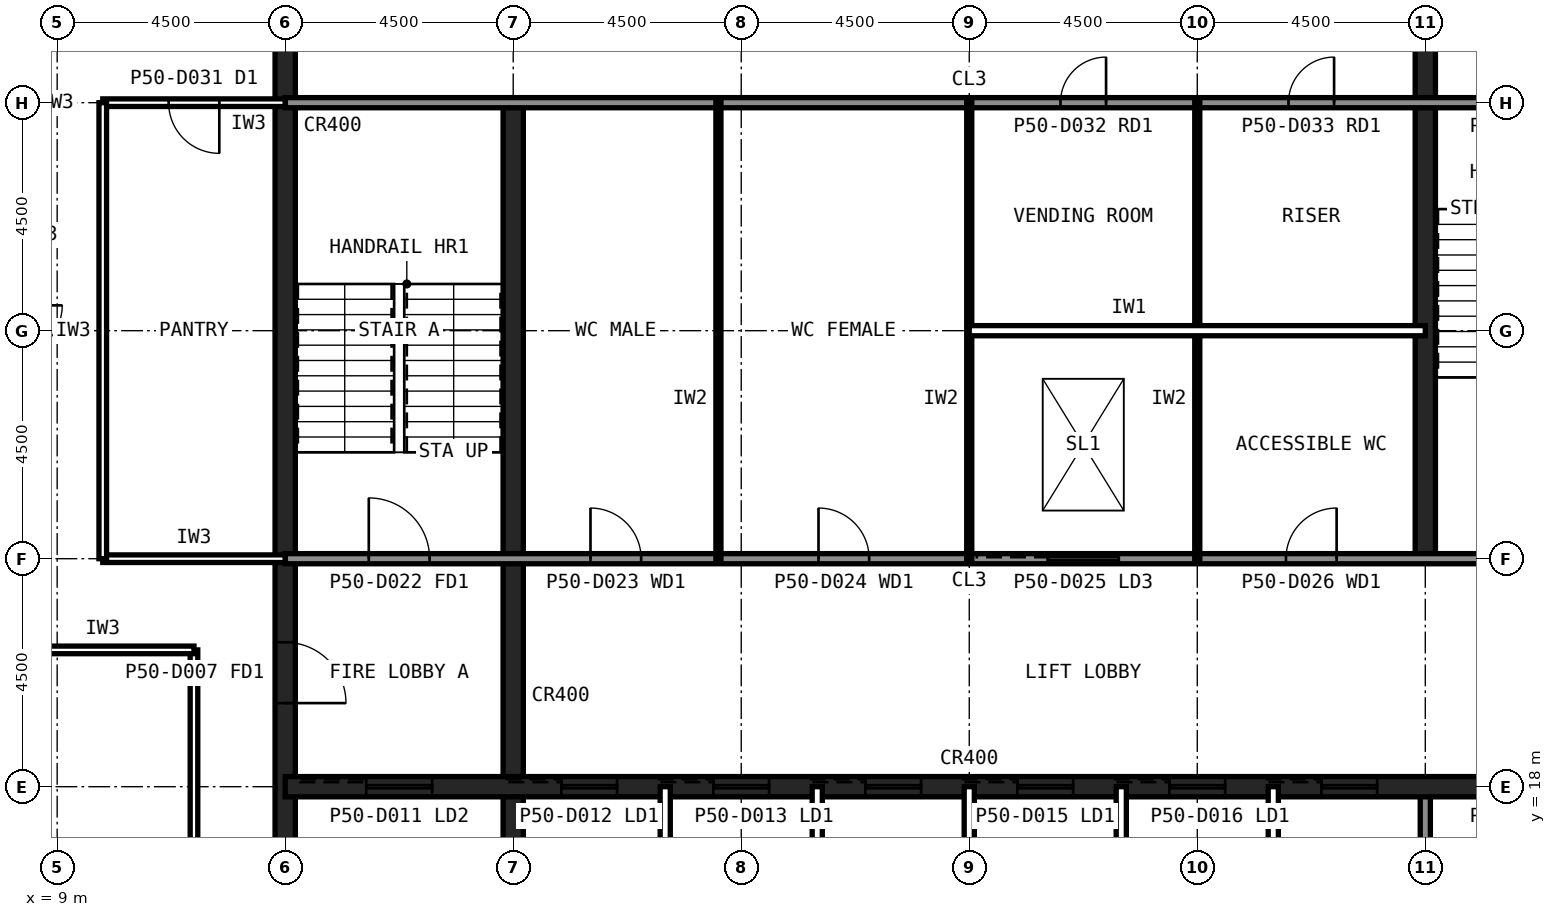
"""IFC4 building model, lengths in metres.
Left out: names, types, materials, properties, quantities, classifications, styles, units other than length and angle.
Written with IfcOpenShell. Run it as: python <this file> out.ifc"""

import sys

from ifc_helpers import new_model, si_unit, direction, frame, frame_2d, origin, place, context, subcontext, project, spatial, rectangle, extrude, element, fill, save


model = new_model("IFC4")
c1 = context("Model", 3, precision=1e-05, world=origin(), true_north=direction((0.0, 1.0)))
c2 = subcontext(c1, "Body", "Model", "MODEL_VIEW")
j1 = project(units=[si_unit("LENGTHUNIT", "METRE"), si_unit("PLANEANGLEUNIT", "RADIAN")], contexts=[c1])
p1 = place(None, origin())
s1 = spatial("IfcSite", under=j1, at=p1, CompositionType="ELEMENT")
p2 = place(p1, origin())
s2 = spatial("IfcBuilding", under=s1, at=p2, CompositionType="ELEMENT")
p3 = place(p2, frame((0.0, 0.0, 214.6)))
s3 = spatial("IfcBuildingStorey", under=s2, at=p3, CompositionType="ELEMENT", Elevation=214.6)
p4 = place(p3, frame((13.5, 40.5, 0.0), z_axis=(0.0, 0.0, 1.0), x_axis=(0.0, -1.0, 0.0)))
e1 = element("IfcWall", 1, at=p4, inside=s3, PredefinedType="SHEAR", context=c2, shape_type="SweptSolid", body=[
    extrude(rectangle(XDim=27.0, YDim=0.4, at=frame_2d((13.5, 0.0))), origin(), (0.0, 0.0, 1.0), 4.0),
])
p5 = place(p4, frame((19.65, 0.0, 0.0)))
e2 = element("IfcOpeningElement", 2, at=p5, cuts=e1, PredefinedType="OPENING", context=c2, shape_type="SweptSolid", body=[
    extrude(rectangle(XDim=1.2, YDim=2.1, at=frame_2d((0.6, 1.05))), frame((0.0, 0.21, 0.0), z_axis=(0.0, -1.0, 0.0), x_axis=(1.0, 0.0, 0.0)), (0.0, 0.0, 1.0), 0.42),
])
p6 = place(p4, frame((5.85, 0.0, 0.0)))
e3 = element("IfcOpeningElement", 3, at=p6, cuts=e1, PredefinedType="OPENING", context=c2, shape_type="SweptSolid", body=[
    extrude(rectangle(XDim=1.8, YDim=2.1, at=frame_2d((0.9, 1.05))), frame((0.0, 0.21, 0.0), z_axis=(0.0, -1.0, 0.0), x_axis=(1.0, 0.0, 0.0)), (0.0, 0.0, 1.0), 0.42),
])
p7 = place(p3, frame((18.0, 13.5, 0.0), z_axis=(0.0, 0.0, 1.0), x_axis=(0.0, 1.0, 0.0)))
e4 = element("IfcWall", 4, at=p7, inside=s3, PredefinedType="SHEAR", context=c2, shape_type="SweptSolid", body=[
    extrude(rectangle(XDim=18.0, YDim=0.4, at=frame_2d((9.0, 0.0))), origin(), (0.0, 0.0, 1.0), 4.0),
])
p8 = place(p3, frame((36.0, 13.5, 0.0), z_axis=(0.0, 0.0, 1.0), x_axis=(0.0, 1.0, 0.0)))
e5 = element("IfcWall", 5, at=p8, inside=s3, PredefinedType="SOLIDWALL", context=c2, shape_type="SweptSolid", body=[
    extrude(rectangle(XDim=4.5, YDim=0.2, at=frame_2d((2.25, 0.0))), origin(), (0.0, 0.0, 1.0), 3.84),
])
p9 = place(p3, frame((36.0, 22.5, 0.0), z_axis=(0.0, 0.0, 1.0), x_axis=(0.0, 1.0, 0.0)))
e6 = element("IfcWall", 6, at=p9, inside=s3, PredefinedType="SHEAR", context=c2, shape_type="SweptSolid", body=[
    extrude(rectangle(XDim=18.0, YDim=0.4, at=frame_2d((9.0, 0.0))), origin(), (0.0, 0.0, 1.0), 4.0),
])
p10 = place(p3, frame((13.5, 18.0, 0.0), z_axis=(0.0, 0.0, 1.0), x_axis=(1.0, 0.0, 0.0)))
e7 = element("IfcWall", 7, at=p10, inside=s3, PredefinedType="SHEAR", context=c2, shape_type="SweptSolid", body=[
    extrude(rectangle(XDim=27.0, YDim=0.4, at=frame_2d((13.5, 0.0))), origin(), (0.0, 0.0, 1.0), 4.0),
])
p11 = place(p10, frame((24.3, 0.0, 0.0)))
e8 = element("IfcOpeningElement", 8, at=p11, cuts=e7, PredefinedType="OPENING", context=c2, shape_type="SweptSolid", body=[
    extrude(rectangle(XDim=0.9, YDim=2.1, at=frame_2d((0.45, 1.05))), frame((0.0, 0.21, 0.0), z_axis=(0.0, -1.0, 0.0), x_axis=(1.0, 0.0, 0.0)), (0.0, 0.0, 1.0), 0.42),
])
p12 = place(p10, frame((5.45, 0.0, 0.0)))
e9 = element("IfcOpeningElement", 9, at=p12, cuts=e7, PredefinedType="OPENING", context=c2, shape_type="SweptSolid", body=[
    extrude(rectangle(XDim=1.1, YDim=2.1, at=frame_2d((0.55, 1.05))), frame((0.0, 0.21, 0.0), z_axis=(0.0, -1.0, 0.0), x_axis=(1.0, 0.0, 0.0)), (0.0, 0.0, 1.0), 0.42),
])
p13 = place(p10, frame((8.45, 0.0, 0.0)))
e10 = element("IfcOpeningElement", 10, at=p13, cuts=e7, PredefinedType="OPENING", context=c2, shape_type="SweptSolid", body=[
    extrude(rectangle(XDim=1.1, YDim=2.1, at=frame_2d((0.55, 1.05))), frame((0.0, 0.21, 0.0), z_axis=(0.0, -1.0, 0.0), x_axis=(1.0, 0.0, 0.0)), (0.0, 0.0, 1.0), 0.42),
])
p14 = place(p10, frame((11.45, 0.0, 0.0)))
e11 = element("IfcOpeningElement", 11, at=p14, cuts=e7, PredefinedType="OPENING", context=c2, shape_type="SweptSolid", body=[
    extrude(rectangle(XDim=1.1, YDim=2.1, at=frame_2d((0.55, 1.05))), frame((0.0, 0.21, 0.0), z_axis=(0.0, -1.0, 0.0), x_axis=(1.0, 0.0, 0.0)), (0.0, 0.0, 1.0), 0.42),
])
p15 = place(p10, frame((14.45, 0.0, 0.0)))
e12 = element("IfcOpeningElement", 12, at=p15, cuts=e7, PredefinedType="OPENING", context=c2, shape_type="SweptSolid", body=[
    extrude(rectangle(XDim=1.1, YDim=2.1, at=frame_2d((0.55, 1.05))), frame((0.0, 0.21, 0.0), z_axis=(0.0, -1.0, 0.0), x_axis=(1.0, 0.0, 0.0)), (0.0, 0.0, 1.0), 0.42),
])
p16 = place(p10, frame((17.45, 0.0, 0.0)))
e13 = element("IfcOpeningElement", 13, at=p16, cuts=e7, PredefinedType="OPENING", context=c2, shape_type="SweptSolid", body=[
    extrude(rectangle(XDim=1.1, YDim=2.1, at=frame_2d((0.55, 1.05))), frame((0.0, 0.21, 0.0), z_axis=(0.0, -1.0, 0.0), x_axis=(1.0, 0.0, 0.0)), (0.0, 0.0, 1.0), 0.42),
])
p17 = place(p10, frame((20.45, 0.0, 0.0)))
e14 = element("IfcOpeningElement", 14, at=p17, cuts=e7, PredefinedType="OPENING", context=c2, shape_type="SweptSolid", body=[
    extrude(rectangle(XDim=1.1, YDim=2.1, at=frame_2d((0.55, 1.05))), frame((0.0, 0.21, 0.0), z_axis=(0.0, -1.0, 0.0), x_axis=(1.0, 0.0, 0.0)), (0.0, 0.0, 1.0), 0.42),
])
p18 = place(p10, frame((1.6, 0.0, 0.0)))
e15 = element("IfcOpeningElement", 15, at=p18, cuts=e7, PredefinedType="OPENING", context=c2, shape_type="SweptSolid", body=[
    extrude(rectangle(XDim=1.3, YDim=2.2, at=frame_2d((0.65, 1.1))), frame((0.0, 0.21, 0.0), z_axis=(0.0, -1.0, 0.0), x_axis=(1.0, 0.0, 0.0)), (0.0, 0.0, 1.0), 0.42),
])
p19 = place(p3, frame((13.5, 22.5, 0.0), z_axis=(0.0, 0.0, 1.0), x_axis=(1.0, 0.0, 0.0)))
e16 = element("IfcWall", 16, at=p19, inside=s3, PredefinedType="SOLIDWALL", context=c2, shape_type="SweptSolid", body=[
    extrude(rectangle(XDim=27.0, YDim=0.2, at=frame_2d((13.5, 0.0))), origin(), (0.0, 0.0, 1.0), 3.84),
])
p20 = place(p19, frame((1.65, 0.0, 0.0)))
e17 = element("IfcOpeningElement", 17, at=p20, cuts=e16, PredefinedType="OPENING", context=c2, shape_type="SweptSolid", body=[
    extrude(rectangle(XDim=1.2, YDim=2.1, at=frame_2d((0.6, 1.05))), frame((0.0, 0.11, 0.0), z_axis=(0.0, -1.0, 0.0), x_axis=(1.0, 0.0, 0.0)), (0.0, 0.0, 1.0), 0.22),
])
p21 = place(p19, frame((6.025, 0.0, 0.0)))
e18 = element("IfcOpeningElement", 18, at=p21, cuts=e16, PredefinedType="OPENING", context=c2, shape_type="SweptSolid", body=[
    extrude(rectangle(XDim=1.0, YDim=2.1, at=frame_2d((0.5, 1.05))), frame((0.0, 0.11, 0.0), z_axis=(0.0, -1.0, 0.0), x_axis=(1.0, 0.0, 0.0)), (0.0, 0.0, 1.0), 0.22),
])
p22 = place(p19, frame((10.525, 0.0, 0.0)))
e19 = element("IfcOpeningElement", 19, at=p22, cuts=e16, PredefinedType="OPENING", context=c2, shape_type="SweptSolid", body=[
    extrude(rectangle(XDim=1.0, YDim=2.1, at=frame_2d((0.5, 1.05))), frame((0.0, 0.11, 0.0), z_axis=(0.0, -1.0, 0.0), x_axis=(1.0, 0.0, 0.0)), (0.0, 0.0, 1.0), 0.22),
])
p23 = place(p19, frame((19.75, 0.0, 0.0)))
e20 = element("IfcOpeningElement", 20, at=p23, cuts=e16, PredefinedType="OPENING", context=c2, shape_type="SweptSolid", body=[
    extrude(rectangle(XDim=1.0, YDim=2.1, at=frame_2d((0.5, 1.05))), frame((0.0, 0.11, 0.0), z_axis=(0.0, -1.0, 0.0), x_axis=(1.0, 0.0, 0.0)), (0.0, 0.0, 1.0), 0.22),
])
p24 = place(p19, frame((15.05, 0.0, 0.0)))
e21 = element("IfcOpeningElement", 21, at=p24, cuts=e16, PredefinedType="OPENING", context=c2, shape_type="SweptSolid", body=[
    extrude(rectangle(XDim=1.4, YDim=2.4, at=frame_2d((0.7, 1.2))), frame((0.0, 0.11, 0.0), z_axis=(0.0, -1.0, 0.0), x_axis=(1.0, 0.0, 0.0)), (0.0, 0.0, 1.0), 0.22),
])
p25 = place(p3, frame((13.5, 31.5, 0.0), z_axis=(0.0, 0.0, 1.0), x_axis=(1.0, 0.0, 0.0)))
e22 = element("IfcWall", 22, at=p25, inside=s3, PredefinedType="SOLIDWALL", context=c2, shape_type="SweptSolid", body=[
    extrude(rectangle(XDim=27.0, YDim=0.2, at=frame_2d((13.5, 0.0))), origin(), (0.0, 0.0, 1.0), 3.84),
])
p26 = place(p25, frame((24.15, 0.0, 0.0)))
e23 = element("IfcOpeningElement", 23, at=p26, cuts=e22, PredefinedType="OPENING", context=c2, shape_type="SweptSolid", body=[
    extrude(rectangle(XDim=1.2, YDim=2.1, at=frame_2d((0.6, 1.05))), frame((0.0, 0.11, 0.0), z_axis=(0.0, -1.0, 0.0), x_axis=(1.0, 0.0, 0.0)), (0.0, 0.0, 1.0), 0.22),
])
p27 = place(p25, frame((15.3, 0.0, 0.0)))
e24 = element("IfcOpeningElement", 24, at=p27, cuts=e22, PredefinedType="OPENING", context=c2, shape_type="SweptSolid", body=[
    extrude(rectangle(XDim=0.9, YDim=2.1, at=frame_2d((0.45, 1.05))), frame((0.0, 0.11, 0.0), z_axis=(0.0, -1.0, 0.0), x_axis=(1.0, 0.0, 0.0)), (0.0, 0.0, 1.0), 0.22),
])
p28 = place(p25, frame((19.8, 0.0, 0.0)))
e25 = element("IfcOpeningElement", 25, at=p28, cuts=e22, PredefinedType="OPENING", context=c2, shape_type="SweptSolid", body=[
    extrude(rectangle(XDim=0.9, YDim=2.1, at=frame_2d((0.45, 1.05))), frame((0.0, 0.11, 0.0), z_axis=(0.0, -1.0, 0.0), x_axis=(1.0, 0.0, 0.0)), (0.0, 0.0, 1.0), 0.22),
])
for number, where, z_axis, x_axis in (
    (26, (21.0, 13.5, 0.0), (0.0, 0.0, 1.0), (0.0, 1.0, 0.0)),
    (27, (24.0, 13.5, 0.0), (0.0, 0.0, 1.0), (0.0, 1.0, 0.0)),
    (28, (27.0, 13.5, 0.0), (0.0, 0.0, 1.0), (0.0, 1.0, 0.0)),
    (29, (30.0, 13.5, 0.0), (0.0, 0.0, 1.0), (0.0, 1.0, 0.0)),
    (30, (33.0, 13.5, 0.0), (0.0, 0.0, 1.0), (0.0, 1.0, 0.0)),
):
    element("IfcWall", number, at=place(p3, frame(where, z_axis=z_axis, x_axis=x_axis)), inside=s3, PredefinedType="PARTITIONING", context=c2, shape_type="SweptSolid", body=[
        extrude(rectangle(XDim=4.5, YDim=0.2, at=frame_2d((2.25, 0.0))), origin(), (0.0, 0.0, 1.0), 3.84),
    ])
for number, where, z_axis, x_axis in (
    (31, (22.05, 22.5, 0.0), (0.0, 0.0, 1.0), (0.0, 1.0, 0.0)),
    (32, (27.0, 22.5, 0.0), (0.0, 0.0, 1.0), (0.0, 1.0, 0.0)),
    (33, (31.5, 22.5, 0.0), (0.0, 0.0, 1.0), (0.0, 1.0, 0.0)),
):
    element("IfcWall", number, at=place(p3, frame(where, z_axis=z_axis, x_axis=x_axis)), inside=s3, PredefinedType="PLUMBINGWALL", context=c2, shape_type="SweptSolid", body=[
        extrude(rectangle(XDim=9.0, YDim=0.1, at=frame_2d((4.5, 0.0))), origin(), (0.0, 0.0, 1.0), 3.84),
    ])
p29 = place(p3, frame((27.0, 27.0, 0.0), z_axis=(0.0, 0.0, 1.0), x_axis=(1.0, 0.0, 0.0)))
e34 = element("IfcWall", 34, at=p29, inside=s3, PredefinedType="PARTITIONING", context=c2, shape_type="SweptSolid", body=[
    extrude(rectangle(XDim=9.0, YDim=0.2, at=frame_2d((4.5, 0.0))), origin(), (0.0, 0.0, 1.0), 3.84),
])
p30 = place(p3, frame((11.7, 20.7, 0.0), z_axis=(0.0, 0.0, 1.0), x_axis=(0.0, -1.0, 0.0)))
e35 = element("IfcWall", 35, at=p30, inside=s3, PredefinedType="PARTITIONING", context=c2, shape_type="SweptSolid", body=[
    extrude(rectangle(XDim=9.0, YDim=0.15, at=frame_2d((4.5, 0.0))), origin(), (0.0, 0.0, 1.0), 3.84),
])
p31 = place(p3, frame((8.1, 20.7, 0.0), z_axis=(0.0, 0.0, 1.0), x_axis=(1.0, 0.0, 0.0)))
e36 = element("IfcWall", 36, at=p31, inside=s3, PredefinedType="PARTITIONING", context=c2, shape_type="SweptSolid", body=[
    extrude(rectangle(XDim=3.6, YDim=0.15, at=frame_2d((1.8, 0.0))), origin(), (0.0, 0.0, 1.0), 3.84),
])
p32 = place(p3, frame((9.9, 22.5, 0.0), z_axis=(0.0, 0.0, 1.0), x_axis=(1.0, 0.0, 0.0)))
e37 = element("IfcWall", 37, at=p32, inside=s3, PredefinedType="PARTITIONING", context=c2, shape_type="SweptSolid", body=[
    extrude(rectangle(XDim=3.6, YDim=0.15, at=frame_2d((1.8, 0.0))), origin(), (0.0, 0.0, 1.0), 2.989),
])
p33 = place(p3, frame((13.5, 31.5, 0.0), z_axis=(0.0, 0.0, 1.0), x_axis=(-1.0, 0.0, 0.0)))
e38 = element("IfcWall", 38, at=p33, inside=s3, PredefinedType="PARTITIONING", context=c2, shape_type="SweptSolid", body=[
    extrude(rectangle(XDim=3.6, YDim=0.15, at=frame_2d((1.8, 0.0))), origin(), (0.0, 0.0, 1.0), 2.989),
])
p34 = place(p33, frame((1.3, 0.0, 0.0)))
e39 = element("IfcOpeningElement", 39, at=p34, cuts=e38, PredefinedType="OPENING", context=c2, shape_type="SweptSolid", body=[
    extrude(rectangle(XDim=1.0, YDim=2.1, at=frame_2d((0.5, 1.05))), frame((0.0, 0.085, 0.0), z_axis=(0.0, -1.0, 0.0), x_axis=(1.0, 0.0, 0.0)), (0.0, 0.0, 1.0), 0.17),
])
p35 = place(p3, frame((9.9, 31.5, 0.0), z_axis=(0.0, 0.0, 1.0), x_axis=(0.0, -1.0, 0.0)))
e40 = element("IfcWall", 40, at=p35, inside=s3, PredefinedType="PARTITIONING", context=c2, shape_type="SweptSolid", body=[
    extrude(rectangle(XDim=9.0, YDim=0.15, at=frame_2d((4.5, 0.0))), origin(), (0.0, 0.0, 1.0), 3.84),
])
p36 = place(p5, origin())
e41 = element("IfcDoor", 41, at=p36, inside=s3, OperationType="SINGLE_SWING_RIGHT", PredefinedType="DOOR", context=c2, shape_type="SweptSolid", body=[
    extrude(rectangle(XDim=1.2, YDim=2.1, at=frame_2d((0.6, 1.05))), frame((0.0, 0.025, 0.0), z_axis=(0.0, -1.0, 0.0), x_axis=(1.0, 0.0, 0.0)), (0.0, 0.0, 1.0), 0.05),
])
fill(e2, e41)
p37 = place(p20, origin())
e42 = element("IfcDoor", 42, at=p37, inside=s3, OperationType="SINGLE_SWING_LEFT", PredefinedType="DOOR", context=c2, shape_type="SweptSolid", body=[
    extrude(rectangle(XDim=1.2, YDim=2.1, at=frame_2d((0.6, 1.05))), frame((0.0, 0.025, 0.0), z_axis=(0.0, -1.0, 0.0), x_axis=(1.0, 0.0, 0.0)), (0.0, 0.0, 1.0), 0.05),
])
fill(e17, e42)
p38 = place(p21, origin())
e43 = element("IfcDoor", 43, at=p38, inside=s3, OperationType="SINGLE_SWING_LEFT", PredefinedType="DOOR", context=c2, shape_type="SweptSolid", body=[
    extrude(rectangle(XDim=1.0, YDim=2.1, at=frame_2d((0.5, 1.05))), frame((0.0, 0.025, 0.0), z_axis=(0.0, -1.0, 0.0), x_axis=(1.0, 0.0, 0.0)), (0.0, 0.0, 1.0), 0.05),
])
fill(e18, e43)
p39 = place(p22, origin())
e44 = element("IfcDoor", 44, at=p39, inside=s3, OperationType="SINGLE_SWING_LEFT", PredefinedType="DOOR", context=c2, shape_type="SweptSolid", body=[
    extrude(rectangle(XDim=1.0, YDim=2.1, at=frame_2d((0.5, 1.05))), frame((0.0, 0.025, 0.0), z_axis=(0.0, -1.0, 0.0), x_axis=(1.0, 0.0, 0.0)), (0.0, 0.0, 1.0), 0.05),
])
fill(e19, e44)
p40 = place(p23, origin())
e45 = element("IfcDoor", 45, at=p40, inside=s3, OperationType="SINGLE_SWING_RIGHT", PredefinedType="DOOR", context=c2, shape_type="SweptSolid", body=[
    extrude(rectangle(XDim=1.0, YDim=2.1, at=frame_2d((0.5, 1.05))), frame((0.0, 0.025, 0.0), z_axis=(0.0, -1.0, 0.0), x_axis=(1.0, 0.0, 0.0)), (0.0, 0.0, 1.0), 0.05),
])
fill(e20, e45)
p41 = place(p27, origin())
e46 = element("IfcDoor", 46, at=p41, inside=s3, OperationType="SINGLE_SWING_RIGHT", PredefinedType="DOOR", context=c2, shape_type="SweptSolid", body=[
    extrude(rectangle(XDim=0.9, YDim=2.1, at=frame_2d((0.45, 1.05))), frame((0.0, 0.025, 0.0), z_axis=(0.0, -1.0, 0.0), x_axis=(1.0, 0.0, 0.0)), (0.0, 0.0, 1.0), 0.05),
])
fill(e24, e46)
p42 = place(p28, origin())
e47 = element("IfcDoor", 47, at=p42, inside=s3, OperationType="SINGLE_SWING_RIGHT", PredefinedType="DOOR", context=c2, shape_type="SweptSolid", body=[
    extrude(rectangle(XDim=0.9, YDim=2.1, at=frame_2d((0.45, 1.05))), frame((0.0, 0.025, 0.0), z_axis=(0.0, -1.0, 0.0), x_axis=(1.0, 0.0, 0.0)), (0.0, 0.0, 1.0), 0.05),
])
fill(e25, e47)
p43 = place(p12, origin())
e48 = element("IfcDoor", 48, at=p43, inside=s3, OperationType="SLIDING_TO_LEFT", PredefinedType="DOOR", context=c2, shape_type="SweptSolid", body=[
    extrude(rectangle(XDim=1.1, YDim=2.1, at=frame_2d((0.55, 1.05))), frame((0.0, 0.025, 0.0), z_axis=(0.0, -1.0, 0.0), x_axis=(1.0, 0.0, 0.0)), (0.0, 0.0, 1.0), 0.05),
])
fill(e9, e48)
p44 = place(p13, origin())
e49 = element("IfcDoor", 49, at=p44, inside=s3, OperationType="SLIDING_TO_LEFT", PredefinedType="DOOR", context=c2, shape_type="SweptSolid", body=[
    extrude(rectangle(XDim=1.1, YDim=2.1, at=frame_2d((0.55, 1.05))), frame((0.0, 0.025, 0.0), z_axis=(0.0, -1.0, 0.0), x_axis=(1.0, 0.0, 0.0)), (0.0, 0.0, 1.0), 0.05),
])
fill(e10, e49)
p45 = place(p14, origin())
e50 = element("IfcDoor", 50, at=p45, inside=s3, OperationType="SLIDING_TO_LEFT", PredefinedType="DOOR", context=c2, shape_type="SweptSolid", body=[
    extrude(rectangle(XDim=1.1, YDim=2.1, at=frame_2d((0.55, 1.05))), frame((0.0, 0.025, 0.0), z_axis=(0.0, -1.0, 0.0), x_axis=(1.0, 0.0, 0.0)), (0.0, 0.0, 1.0), 0.05),
])
fill(e11, e50)
p46 = place(p15, origin())
e51 = element("IfcDoor", 51, at=p46, inside=s3, OperationType="SLIDING_TO_LEFT", PredefinedType="DOOR", context=c2, shape_type="SweptSolid", body=[
    extrude(rectangle(XDim=1.1, YDim=2.1, at=frame_2d((0.55, 1.05))), frame((0.0, 0.025, 0.0), z_axis=(0.0, -1.0, 0.0), x_axis=(1.0, 0.0, 0.0)), (0.0, 0.0, 1.0), 0.05),
])
fill(e12, e51)
p47 = place(p16, origin())
e52 = element("IfcDoor", 52, at=p47, inside=s3, OperationType="SLIDING_TO_LEFT", PredefinedType="DOOR", context=c2, shape_type="SweptSolid", body=[
    extrude(rectangle(XDim=1.1, YDim=2.1, at=frame_2d((0.55, 1.05))), frame((0.0, 0.025, 0.0), z_axis=(0.0, -1.0, 0.0), x_axis=(1.0, 0.0, 0.0)), (0.0, 0.0, 1.0), 0.05),
])
fill(e13, e52)
p48 = place(p17, origin())
e53 = element("IfcDoor", 53, at=p48, inside=s3, OperationType="SLIDING_TO_LEFT", PredefinedType="DOOR", context=c2, shape_type="SweptSolid", body=[
    extrude(rectangle(XDim=1.1, YDim=2.1, at=frame_2d((0.55, 1.05))), frame((0.0, 0.025, 0.0), z_axis=(0.0, -1.0, 0.0), x_axis=(1.0, 0.0, 0.0)), (0.0, 0.0, 1.0), 0.05),
])
fill(e14, e53)
p49 = place(p18, origin())
e54 = element("IfcDoor", 54, at=p49, inside=s3, OperationType="SLIDING_TO_LEFT", PredefinedType="DOOR", context=c2, shape_type="SweptSolid", body=[
    extrude(rectangle(XDim=1.3, YDim=2.2, at=frame_2d((0.65, 1.1))), frame((0.0, 0.025, 0.0), z_axis=(0.0, -1.0, 0.0), x_axis=(1.0, 0.0, 0.0)), (0.0, 0.0, 1.0), 0.05),
])
fill(e15, e54)
p50 = place(p24, origin())
e55 = element("IfcDoor", 55, at=p50, inside=s3, OperationType="SLIDING_TO_LEFT", PredefinedType="DOOR", context=c2, shape_type="SweptSolid", body=[
    extrude(rectangle(XDim=1.4, YDim=2.4, at=frame_2d((0.7, 1.2))), frame((0.0, 0.025, 0.0), z_axis=(0.0, -1.0, 0.0), x_axis=(1.0, 0.0, 0.0)), (0.0, 0.0, 1.0), 0.05),
])
fill(e21, e55)
p51 = place(p34, origin())
e56 = element("IfcDoor", 56, at=p51, inside=s3, OperationType="SINGLE_SWING_LEFT", PredefinedType="DOOR", context=c2, shape_type="SweptSolid", body=[
    extrude(rectangle(XDim=1.0, YDim=2.1, at=frame_2d((0.5, 1.05))), frame((0.0, 0.025, 0.0), z_axis=(0.0, -1.0, 0.0), x_axis=(1.0, 0.0, 0.0)), (0.0, 0.0, 1.0), 0.05),
])
fill(e39, e56)
save(model, sys.argv[1])
